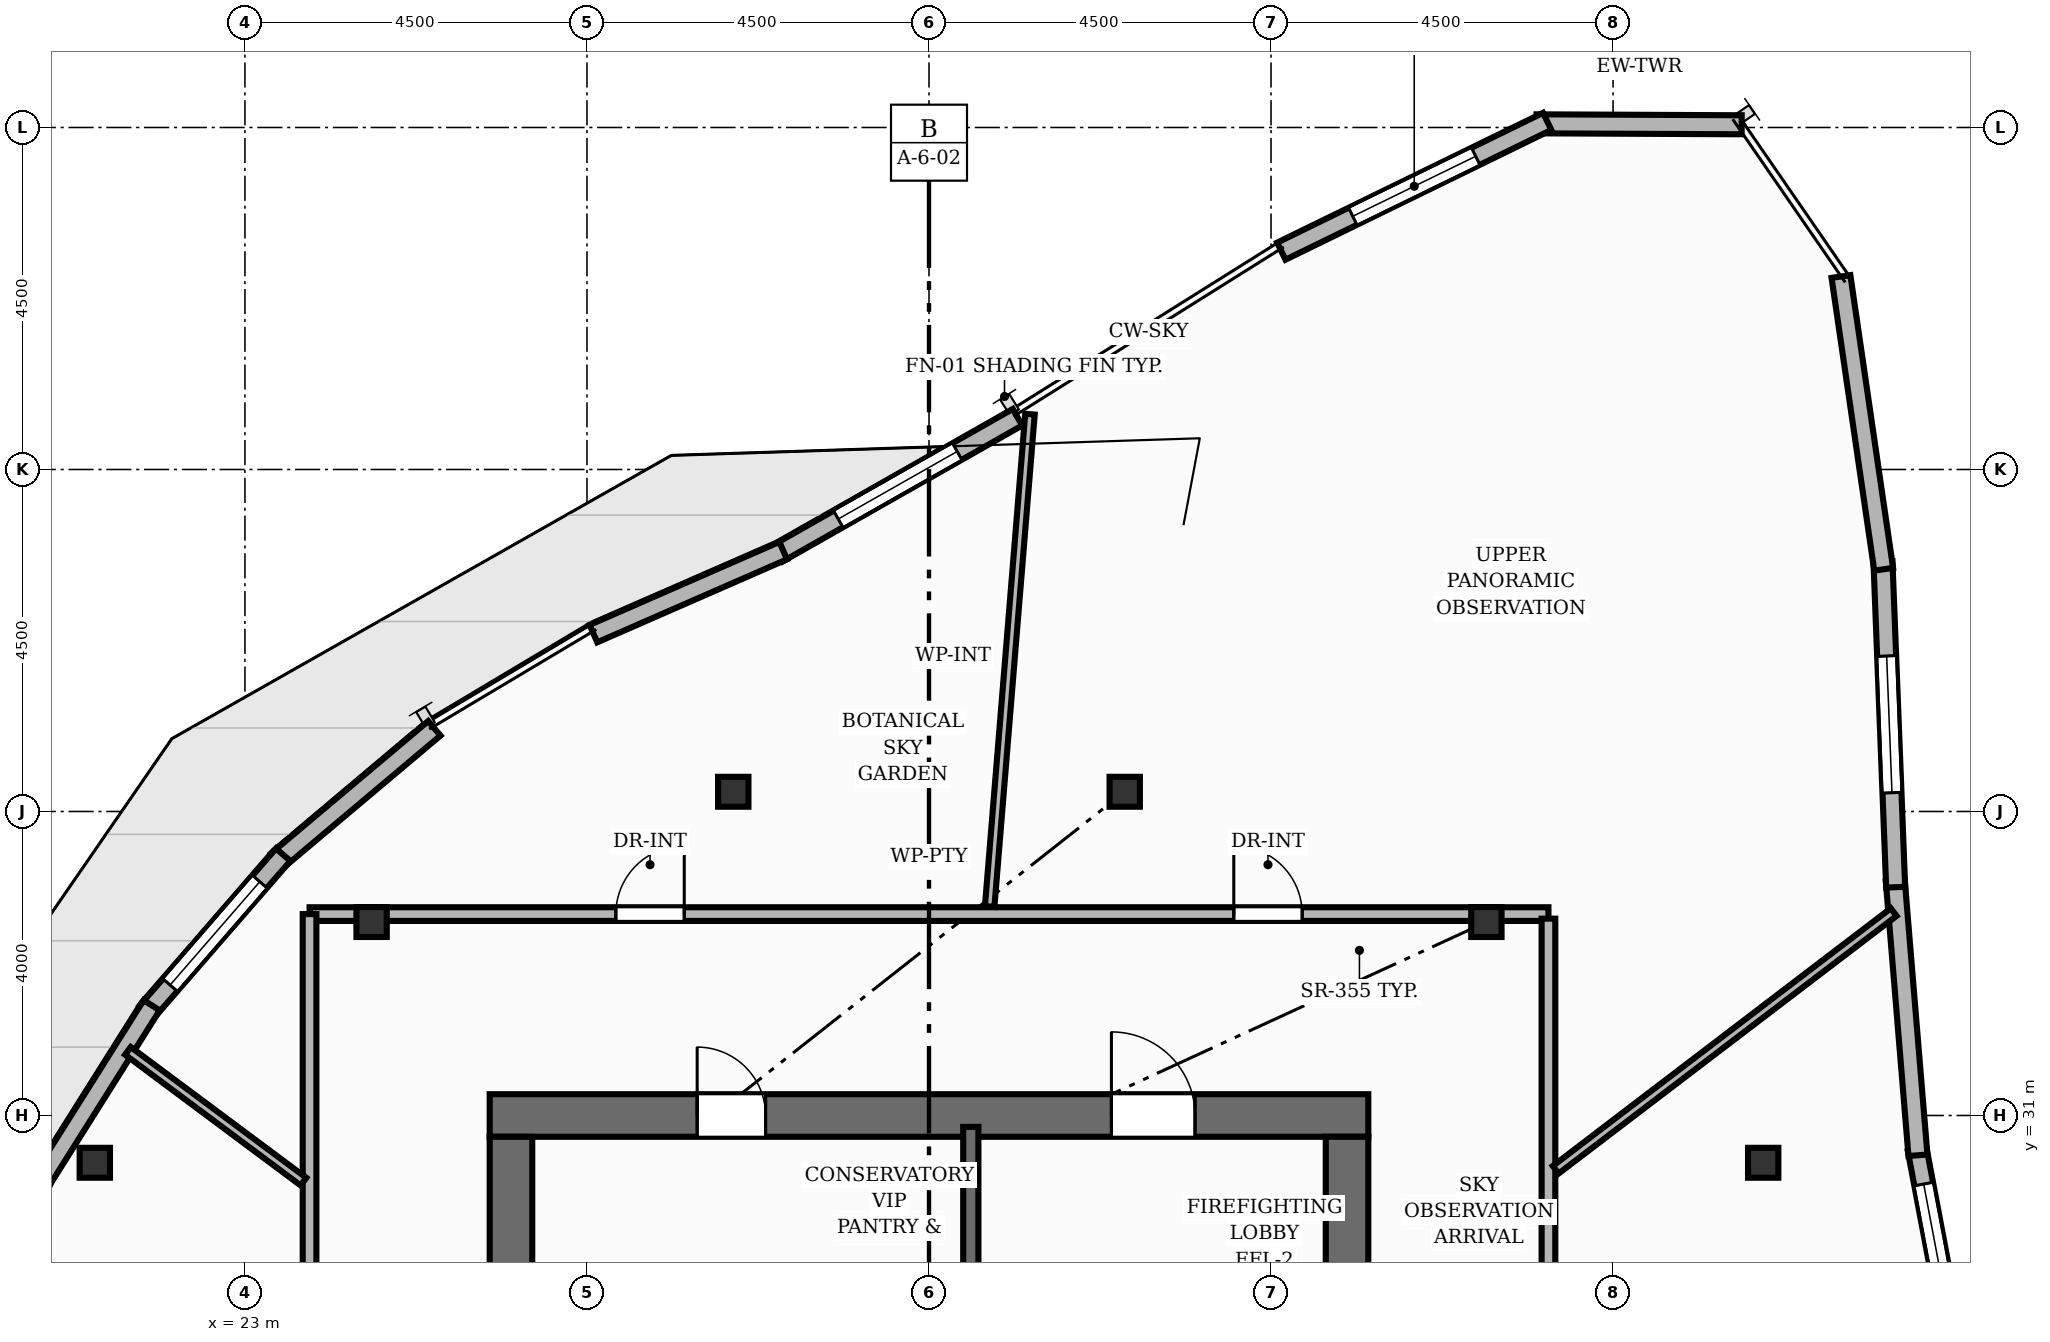
"""IFC4 building model, lengths in metres.
Left out: names, types, materials, properties, quantities, classifications, styles, units other than length and angle.
Written with IfcOpenShell. Run it as: python <this file> out.ifc"""

import sys

from ifc_helpers import new_model, si_unit, direction, frame, frame_2d, origin, origin_2d, place, context, subcontext, project, spatial, rectangle, i_section, extrude, element, fill, save


model = new_model("IFC4")
c1 = context("Model", 3, precision=1e-05, world=origin(), true_north=direction((0.0, 1.0)))
c2 = subcontext(c1, "Body", "Model", "MODEL_VIEW")
j1 = project(units=[si_unit("LENGTHUNIT", "METRE"), si_unit("PLANEANGLEUNIT", "RADIAN")], contexts=[c1])
p1 = place(None, origin())
s1 = spatial("IfcSite", under=j1, at=p1, CompositionType="ELEMENT")
p2 = place(p1, origin())
s2 = spatial("IfcBuilding", under=s1, at=p2, CompositionType="ELEMENT")
p3 = place(p2, frame((0.0, 0.0, 246.88)))
s3 = spatial("IfcBuildingStorey", under=s2, at=p3, CompositionType="ELEMENT", Elevation=246.88)
p4 = place(p3, frame((26.22, 31.0, 0.0), z_axis=(0.0, 0.0, 1.0), x_axis=(1.0, 0.0, 0.0)))
e1 = element("IfcWall", 1, at=p4, inside=s3, PredefinedType="SHEAR", context=c2, shape_type="SweptSolid", body=[
    extrude(rectangle(XDim=11.56, YDim=0.56, at=frame_2d((5.78, 0.0))), origin(), (0.0, 0.0, 1.0), 4.16),
])
p5 = place(p4, frame((8.18, 0.0, 0.0)))
e2 = element("IfcOpeningElement", 2, at=p5, cuts=e1, PredefinedType="OPENING", context=c2, shape_type="SweptSolid", body=[
    extrude(rectangle(XDim=1.1, YDim=2.0, at=frame_2d((0.55, 1.0))), frame((0.0, 0.29, 0.0), z_axis=(0.0, -1.0, 0.0), x_axis=(1.0, 0.0, 0.0)), (0.0, 0.0, 1.0), 0.58),
])
p6 = place(p4, frame((2.73, 0.0, 0.0)))
e3 = element("IfcOpeningElement", 3, at=p6, cuts=e1, PredefinedType="OPENING", context=c2, shape_type="SweptSolid", body=[
    extrude(rectangle(XDim=0.9, YDim=2.1, at=frame_2d((0.45, 1.05))), frame((0.0, 0.29, 0.0), z_axis=(0.0, -1.0, 0.0), x_axis=(1.0, 0.0, 0.0)), (0.0, 0.0, 1.0), 0.58),
])
for number, where, z_axis, x_axis in (
    (4, (26.5, 17.28, 0.0), (0.0, 0.0, 1.0), (0.0, 1.0, 0.0)),
    (5, (37.5, 17.28, 0.0), (0.0, 0.0, 1.0), (0.0, 1.0, 0.0)),
):
    element("IfcWall", number, at=place(p3, frame(where, z_axis=z_axis, x_axis=x_axis)), inside=s3, PredefinedType="SHEAR", context=c2, shape_type="SweptSolid", body=[
        extrude(rectangle(XDim=13.44, YDim=0.56, at=frame_2d((6.72, 0.0))), origin(), (0.0, 0.0, 1.0), 4.16),
    ])
for number, where, z_axis, x_axis in (
    (6, (42.975, 30.378, 0.0), (0.0, 0.0, 1.0), (1.0, 0.0, 0.0)),
    (7, (39.333, 33.545, 0.0), (0.0, 0.0, 1.0), (1.0, 0.0, 0.0)),
    (8, (34.575, 35.26, 0.0), (0.0, 0.0, 1.0), (1.0, 0.0, 0.0)),
    (9, (29.425, 35.26, 0.0), (0.0, 0.0, 1.0), (1.0, 0.0, 0.0)),
    (10, (24.667, 33.545, 0.0), (0.0, 0.0, 1.0), (1.0, 0.0, 0.0)),
    (11, (21.025, 30.378, 0.0), (0.0, 0.0, 1.0), (1.0, 0.0, 0.0)),
):
    element("IfcColumn", number, at=place(p3, frame(where, z_axis=z_axis, x_axis=x_axis)), inside=s3, PredefinedType="COLUMN", context=c2, shape_type="SweptSolid", body=[
        extrude(i_section(OverallWidth=0.399, OverallDepth=0.394, WebThickness=0.023, FlangeThickness=0.037, at=origin_2d()), origin(), (0.0, 0.0, 1.0), 4.16),
    ])
p7 = place(p3, frame((39.993, 44.048, 0.0), z_axis=(0.0, 0.0, 1.0), x_axis=(0.999989775814, -0.004521976014, 0.0)))
e12 = element("IfcWall", 12, at=p7, inside=s3, PredefinedType="SOLIDWALL", context=c2, shape_type="SweptSolid", body=[
    extrude(rectangle(XDim=2.699, YDim=0.25, at=frame_2d((1.35, 0.0))), origin(), (0.0, 0.0, 1.0), 3.84),
])
p8 = place(p3, frame((36.635, 42.373, 0.0), z_axis=(0.0, 0.0, 1.0), x_axis=(0.89863881812, 0.438689268808, 0.0)))
e13 = element("IfcWall", 13, at=p8, inside=s3, PredefinedType="SOLIDWALL", context=c2, shape_type="SweptSolid", body=[
    extrude(rectangle(XDim=3.893, YDim=0.25, at=frame_2d((1.946, 0.0))), origin(), (0.0, 0.0, 1.0), 3.84),
])
p9 = place(p8, frame((1.046, 0.0, 0.85)))
e14 = element("IfcOpeningElement", 14, at=p9, cuts=e13, PredefinedType="OPENING", context=c2, shape_type="SweptSolid", body=[
    extrude(rectangle(XDim=1.8, YDim=2.0, at=frame_2d((0.9, 1.0))), frame((0.0, 0.135, 0.0), z_axis=(0.0, -1.0, 0.0), x_axis=(1.0, 0.0, 0.0)), (0.0, 0.0, 1.0), 0.27),
])
p10 = place(p3, frame((30.013, 38.398, 0.0), z_axis=(0.0, 0.0, 1.0), x_axis=(0.869529546149, 0.493880925298, 0.0)))
e15 = element("IfcWall", 15, at=p10, inside=s3, PredefinedType="SOLIDWALL", context=c2, shape_type="SweptSolid", body=[
    extrude(rectangle(XDim=3.624, YDim=0.25, at=frame_2d((1.812, 0.0))), origin(), (0.0, 0.0, 1.0), 3.84),
])
p11 = place(p10, frame((0.912, 0.0, 0.85)))
e16 = element("IfcOpeningElement", 16, at=p11, cuts=e15, PredefinedType="OPENING", context=c2, shape_type="SweptSolid", body=[
    extrude(rectangle(XDim=1.8, YDim=2.0, at=frame_2d((0.9, 1.0))), frame((0.0, 0.135, 0.0), z_axis=(0.0, -1.0, 0.0), x_axis=(1.0, 0.0, 0.0)), (0.0, 0.0, 1.0), 0.27),
])
p12 = place(p3, frame((27.585, 37.34, 0.0), z_axis=(0.0, 0.0, 1.0), x_axis=(0.916233396171, 0.400644934749, 0.0)))
e17 = element("IfcWall", 17, at=p12, inside=s3, PredefinedType="SOLIDWALL", context=c2, shape_type="SweptSolid", body=[
    extrude(rectangle(XDim=2.725, YDim=0.25, at=frame_2d((1.363, 0.0))), origin(), (0.0, 0.0, 1.0), 3.84),
])
p13 = place(p3, frame((23.425, 34.354, 0.0), z_axis=(0.0, 0.0, 1.0), x_axis=(0.765011949935, 0.644016084005, 0.0)))
e18 = element("IfcWall", 18, at=p13, inside=s3, PredefinedType="SOLIDWALL", context=c2, shape_type="SweptSolid", body=[
    extrude(rectangle(XDim=2.702, YDim=0.25, at=frame_2d((1.351, 0.0))), origin(), (0.0, 0.0, 1.0), 3.84),
])
p14 = place(p3, frame((21.708, 32.363, 0.0), z_axis=(0.0, 0.0, 1.0), x_axis=(0.655463265554, 0.755227056924, 0.0)))
e19 = element("IfcWall", 19, at=p14, inside=s3, PredefinedType="SOLIDWALL", context=c2, shape_type="SweptSolid", body=[
    extrude(rectangle(XDim=2.738, YDim=0.25, at=frame_2d((1.369, 0.0))), origin(), (0.0, 0.0, 1.0), 3.84),
])
p15 = place(p14, frame((0.469, 0.0, 0.85)))
e20 = element("IfcOpeningElement", 20, at=p15, cuts=e19, PredefinedType="OPENING", context=c2, shape_type="SweptSolid", body=[
    extrude(rectangle(XDim=1.8, YDim=2.0, at=frame_2d((0.9, 1.0))), frame((0.0, 0.135, 0.0), z_axis=(0.0, -1.0, 0.0), x_axis=(1.0, 0.0, 0.0)), (0.0, 0.0, 1.0), 0.27),
])
p16 = place(p3, frame((20.303, 30.116, 0.0), z_axis=(0.0, 0.0, 1.0), x_axis=(0.532693532032, 0.846308218636, 0.0)))
e21 = element("IfcWall", 21, at=p16, inside=s3, PredefinedType="SOLIDWALL", context=c2, shape_type="SweptSolid", body=[
    extrude(rectangle(XDim=2.758, YDim=0.25, at=frame_2d((1.379, 0.0))), origin(), (0.0, 0.0, 1.0), 3.84),
])
p17 = place(p3, frame((19.255, 27.683, 0.0), z_axis=(0.0, 0.0, 1.0), x_axis=(0.398625762511, 0.917113679683, 0.0)))
e22 = element("IfcWall", 22, at=p17, inside=s3, PredefinedType="SOLIDWALL", context=c2, shape_type="SweptSolid", body=[
    extrude(rectangle(XDim=2.758, YDim=0.25, at=frame_2d((1.379, 0.0))), origin(), (0.0, 0.0, 1.0), 3.84),
])
p18 = place(p17, frame((0.479, 0.0, 0.85)))
e23 = element("IfcOpeningElement", 23, at=p18, cuts=e22, PredefinedType="OPENING", context=c2, shape_type="SweptSolid", body=[
    extrude(rectangle(XDim=1.8, YDim=2.0, at=frame_2d((0.9, 1.0))), frame((0.0, 0.135, 0.0), z_axis=(0.0, -1.0, 0.0), x_axis=(1.0, 0.0, 0.0)), (0.0, 0.0, 1.0), 0.27),
])
p19 = place(p3, frame((45.001, 30.553, 0.0), z_axis=(0.0, 0.0, 1.0), x_axis=(0.185629842264, -0.982619744184, 0.0)))
e24 = element("IfcWall", 24, at=p19, inside=s3, PredefinedType="SOLIDWALL", context=c2, shape_type="SweptSolid", body=[
    extrude(rectangle(XDim=2.725, YDim=0.25, at=frame_2d((1.363, 0.0))), origin(), (0.0, 0.0, 1.0), 3.84),
])
p20 = place(p19, frame((0.463, 0.0, 0.85)))
e25 = element("IfcOpeningElement", 25, at=p20, cuts=e24, PredefinedType="OPENING", context=c2, shape_type="SweptSolid", body=[
    extrude(rectangle(XDim=1.8, YDim=2.0, at=frame_2d((0.9, 1.0))), frame((0.0, 0.135, 0.0), z_axis=(0.0, -1.0, 0.0), x_axis=(1.0, 0.0, 0.0)), (0.0, 0.0, 1.0), 0.27),
])
p21 = place(p3, frame((44.713, 34.088, 0.0), z_axis=(0.0, 0.0, 1.0), x_axis=(0.082331752524, -0.996604978177, 0.0)))
e26 = element("IfcWall", 26, at=p21, inside=s3, PredefinedType="SOLIDWALL", context=c2, shape_type="SweptSolid", body=[
    extrude(rectangle(XDim=3.624, YDim=0.25, at=frame_2d((1.812, 0.0))), origin(), (0.0, 0.0, 1.0), 3.84),
])
p22 = place(p3, frame((44.551, 38.29, 0.0), z_axis=(0.0, 0.0, 1.0), x_axis=(0.038990550377, -0.999239579371, 0.0)))
e27 = element("IfcWall", 27, at=p22, inside=s3, PredefinedType="SOLIDWALL", context=c2, shape_type="SweptSolid", body=[
    extrude(rectangle(XDim=4.289, YDim=0.25, at=frame_2d((2.145, 0.0))), origin(), (0.0, 0.0, 1.0), 3.84),
])
p23 = place(p22, frame((1.245, 0.0, 0.85)))
e28 = element("IfcOpeningElement", 28, at=p23, cuts=e27, PredefinedType="OPENING", context=c2, shape_type="SweptSolid", body=[
    extrude(rectangle(XDim=1.8, YDim=2.0, at=frame_2d((0.9, 1.0))), frame((0.0, 0.135, 0.0), z_axis=(0.0, -1.0, 0.0), x_axis=(1.0, 0.0, 0.0)), (0.0, 0.0, 1.0), 0.27),
])
p24 = place(p3, frame((43.999, 42.039, 0.0), z_axis=(0.0, 0.0, 1.0), x_axis=(0.144370860883, -0.989523650312, 0.0)))
e29 = element("IfcWall", 29, at=p24, inside=s3, PredefinedType="SOLIDWALL", context=c2, shape_type="SweptSolid", body=[
    extrude(rectangle(XDim=3.893, YDim=0.25, at=frame_2d((1.946, 0.0))), origin(), (0.0, 0.0, 1.0), 3.84),
])
p25 = place(p3, frame((32.55, 27.35, 0.0), z_axis=(0.0, 0.0, 1.0), x_axis=(0.0, 1.0, 0.0)))
e30 = element("IfcWall", 30, at=p25, inside=s3, PredefinedType="SHEAR", context=c2, shape_type="SweptSolid", body=[
    extrude(rectangle(XDim=3.5, YDim=0.2, at=frame_2d((1.75, 0.0))), origin(), (0.0, 0.0, 1.0), 4.16),
])
p26 = place(p3, frame((23.85, 33.65, 0.0), z_axis=(0.0, 0.0, 1.0), x_axis=(1.0, 0.0, 0.0)))
e31 = element("IfcWall", 31, at=p26, inside=s3, PredefinedType="PARTITIONING", context=c2, shape_type="SweptSolid", body=[
    extrude(rectangle(XDim=16.3, YDim=0.18, at=frame_2d((8.15, 0.0))), origin(), (0.0, 0.0, 1.0), 2.9),
])
p27 = place(p26, frame((12.16, 0.0, 0.0)))
e32 = element("IfcOpeningElement", 32, at=p27, cuts=e31, PredefinedType="OPENING", context=c2, shape_type="SweptSolid", body=[
    extrude(rectangle(XDim=0.9, YDim=2.1, at=frame_2d((0.45, 1.05))), frame((0.0, 0.1, 0.0), z_axis=(0.0, -1.0, 0.0), x_axis=(1.0, 0.0, 0.0)), (0.0, 0.0, 1.0), 0.2),
])
p28 = place(p26, frame((4.03, 0.0, 0.0)))
e33 = element("IfcOpeningElement", 33, at=p28, cuts=e31, PredefinedType="OPENING", context=c2, shape_type="SweptSolid", body=[
    extrude(rectangle(XDim=0.9, YDim=2.1, at=frame_2d((0.45, 1.05))), frame((0.0, 0.1, 0.0), z_axis=(0.0, -1.0, 0.0), x_axis=(1.0, 0.0, 0.0)), (0.0, 0.0, 1.0), 0.2),
])
p29 = place(p3, frame((40.15, 33.59, 0.0), z_axis=(0.0, 0.0, 1.0), x_axis=(0.0, -1.0, 0.0)))
e34 = element("IfcWall", 34, at=p29, inside=s3, PredefinedType="PARTITIONING", context=c2, shape_type="SweptSolid", body=[
    extrude(rectangle(XDim=19.24, YDim=0.18, at=frame_2d((9.62, 0.0))), origin(), (0.0, 0.0, 1.0), 3.835),
])
p30 = place(p29, frame((9.138, 0.0, 0.0)))
e35 = element("IfcOpeningElement", 35, at=p30, cuts=e34, PredefinedType="OPENING", context=c2, shape_type="SweptSolid", body=[
    extrude(rectangle(XDim=0.9, YDim=2.1, at=frame_2d((0.45, 1.05))), frame((0.0, 0.1, 0.0), z_axis=(0.0, -1.0, 0.0), x_axis=(1.0, 0.0, 0.0)), (0.0, 0.0, 1.0), 0.2),
])
p31 = place(p29, frame((17.059, 0.0, 0.0)))
e36 = element("IfcOpeningElement", 36, at=p31, cuts=e34, PredefinedType="OPENING", context=c2, shape_type="SweptSolid", body=[
    extrude(rectangle(XDim=0.9, YDim=2.1, at=frame_2d((0.45, 1.05))), frame((0.0, 0.1, 0.0), z_axis=(0.0, -1.0, 0.0), x_axis=(1.0, 0.0, 0.0)), (0.0, 0.0, 1.0), 0.2),
])
p32 = place(p3, frame((23.85, 14.35, 0.0), z_axis=(0.0, 0.0, 1.0), x_axis=(0.0, 1.0, 0.0)))
e37 = element("IfcWall", 37, at=p32, inside=s3, PredefinedType="PARTITIONING", context=c2, shape_type="SweptSolid", body=[
    extrude(rectangle(XDim=19.3, YDim=0.18, at=frame_2d((9.65, 0.0))), origin(), (0.0, 0.0, 1.0), 3.835),
])
p33 = place(p32, frame((8.652, 0.0, 0.0)))
e38 = element("IfcOpeningElement", 38, at=p33, cuts=e37, PredefinedType="OPENING", context=c2, shape_type="SweptSolid", body=[
    extrude(rectangle(XDim=0.9, YDim=2.1, at=frame_2d((0.45, 1.05))), frame((0.0, 0.1, 0.0), z_axis=(0.0, -1.0, 0.0), x_axis=(1.0, 0.0, 0.0)), (0.0, 0.0, 1.0), 0.2),
])
p34 = place(p3, frame((32.798, 33.75, 0.0), z_axis=(0.0, 0.0, 1.0), x_axis=(0.081618619875, 0.996663634778, 0.0)))
e39 = element("IfcWall", 39, at=p34, inside=s3, PredefinedType="PARTITIONING", context=c2, shape_type="SweptSolid", body=[
    extrude(rectangle(XDim=6.5, YDim=0.125, at=frame_2d((3.25, 0.0))), origin(), (0.0, 0.0, 1.0), 3.835),
])
p35 = place(p3, frame((44.692, 33.676, 0.0), z_axis=(0.0, 0.0, 1.0), x_axis=(-0.795254273131, -0.606276043619, 0.0)))
e40 = element("IfcWall", 40, at=p35, inside=s3, PredefinedType="PARTITIONING", context=c2, shape_type="SweptSolid", body=[
    extrude(rectangle(XDim=5.591, YDim=0.125, at=frame_2d((2.796, 0.0))), origin(), (0.0, 0.0, 1.0), 3.835),
])
p36 = place(p3, frame((23.77, 30.13, 0.0), z_axis=(0.0, 0.0, 1.0), x_axis=(-0.801989535219, 0.597338082997, 0.0)))
e41 = element("IfcWall", 41, at=p36, inside=s3, PredefinedType="PARTITIONING", context=c2, shape_type="SweptSolid", body=[
    extrude(rectangle(XDim=2.88, YDim=0.125, at=frame_2d((1.44, 0.0))), origin(), (0.0, 0.0, 1.0), 3.835),
])
p37 = place(p9, origin())
e42 = element("IfcWindow", 42, at=p37, inside=s3, PartitioningType="SINGLE_PANEL", PredefinedType="WINDOW", context=c2, shape_type="SweptSolid", body=[
    extrude(rectangle(XDim=1.8, YDim=2.0, at=frame_2d((0.9, 1.0))), frame((0.0, 0.03, 0.0), z_axis=(0.0, -1.0, 0.0), x_axis=(1.0, 0.0, 0.0)), (0.0, 0.0, 1.0), 0.06),
])
fill(e14, e42)
p38 = place(p11, origin())
e43 = element("IfcWindow", 43, at=p38, inside=s3, PartitioningType="SINGLE_PANEL", PredefinedType="WINDOW", context=c2, shape_type="SweptSolid", body=[
    extrude(rectangle(XDim=1.8, YDim=2.0, at=frame_2d((0.9, 1.0))), frame((0.0, 0.03, 0.0), z_axis=(0.0, -1.0, 0.0), x_axis=(1.0, 0.0, 0.0)), (0.0, 0.0, 1.0), 0.06),
])
fill(e16, e43)
p39 = place(p15, origin())
e44 = element("IfcWindow", 44, at=p39, inside=s3, PartitioningType="SINGLE_PANEL", PredefinedType="WINDOW", context=c2, shape_type="SweptSolid", body=[
    extrude(rectangle(XDim=1.8, YDim=2.0, at=frame_2d((0.9, 1.0))), frame((0.0, 0.03, 0.0), z_axis=(0.0, -1.0, 0.0), x_axis=(1.0, 0.0, 0.0)), (0.0, 0.0, 1.0), 0.06),
])
fill(e20, e44)
p40 = place(p20, origin())
e45 = element("IfcWindow", 45, at=p40, inside=s3, PartitioningType="SINGLE_PANEL", PredefinedType="WINDOW", context=c2, shape_type="SweptSolid", body=[
    extrude(rectangle(XDim=1.8, YDim=2.0, at=frame_2d((0.9, 1.0))), frame((0.0, 0.03, 0.0), z_axis=(0.0, -1.0, 0.0), x_axis=(1.0, 0.0, 0.0)), (0.0, 0.0, 1.0), 0.06),
])
fill(e25, e45)
p41 = place(p23, origin())
e46 = element("IfcWindow", 46, at=p41, inside=s3, PartitioningType="SINGLE_PANEL", PredefinedType="WINDOW", context=c2, shape_type="SweptSolid", body=[
    extrude(rectangle(XDim=1.8, YDim=2.0, at=frame_2d((0.9, 1.0))), frame((0.0, 0.03, 0.0), z_axis=(0.0, -1.0, 0.0), x_axis=(1.0, 0.0, 0.0)), (0.0, 0.0, 1.0), 0.06),
])
fill(e28, e46)
p42 = place(p5, origin())
e47 = element("IfcDoor", 47, at=p42, inside=s3, OperationType="SINGLE_SWING_LEFT", PredefinedType="DOOR", context=c2, shape_type="SweptSolid", body=[
    extrude(rectangle(XDim=1.1, YDim=2.0, at=frame_2d((0.55, 1.0))), frame((0.0, 0.025, 0.0), z_axis=(0.0, -1.0, 0.0), x_axis=(1.0, 0.0, 0.0)), (0.0, 0.0, 1.0), 0.05),
])
fill(e2, e47)
p43 = place(p6, origin())
e48 = element("IfcDoor", 48, at=p43, inside=s3, OperationType="SINGLE_SWING_LEFT", PredefinedType="DOOR", context=c2, shape_type="SweptSolid", body=[
    extrude(rectangle(XDim=0.9, YDim=2.1, at=frame_2d((0.45, 1.05))), frame((0.0, 0.025, 0.0), z_axis=(0.0, -1.0, 0.0), x_axis=(1.0, 0.0, 0.0)), (0.0, 0.0, 1.0), 0.05),
])
fill(e3, e48)
p44 = place(p27, origin())
e49 = element("IfcDoor", 49, at=p44, inside=s3, OperationType="SINGLE_SWING_LEFT", PredefinedType="DOOR", context=c2, shape_type="SweptSolid", body=[
    extrude(rectangle(XDim=0.9, YDim=2.1, at=frame_2d((0.45, 1.05))), frame((0.0, 0.025, 0.0), z_axis=(0.0, -1.0, 0.0), x_axis=(1.0, 0.0, 0.0)), (0.0, 0.0, 1.0), 0.05),
])
fill(e32, e49)
p45 = place(p28, origin())
e50 = element("IfcDoor", 50, at=p45, inside=s3, OperationType="SINGLE_SWING_RIGHT", PredefinedType="DOOR", context=c2, shape_type="SweptSolid", body=[
    extrude(rectangle(XDim=0.9, YDim=2.1, at=frame_2d((0.45, 1.05))), frame((0.0, 0.025, 0.0), z_axis=(0.0, -1.0, 0.0), x_axis=(1.0, 0.0, 0.0)), (0.0, 0.0, 1.0), 0.05),
])
fill(e33, e50)
save(model, sys.argv[1])
